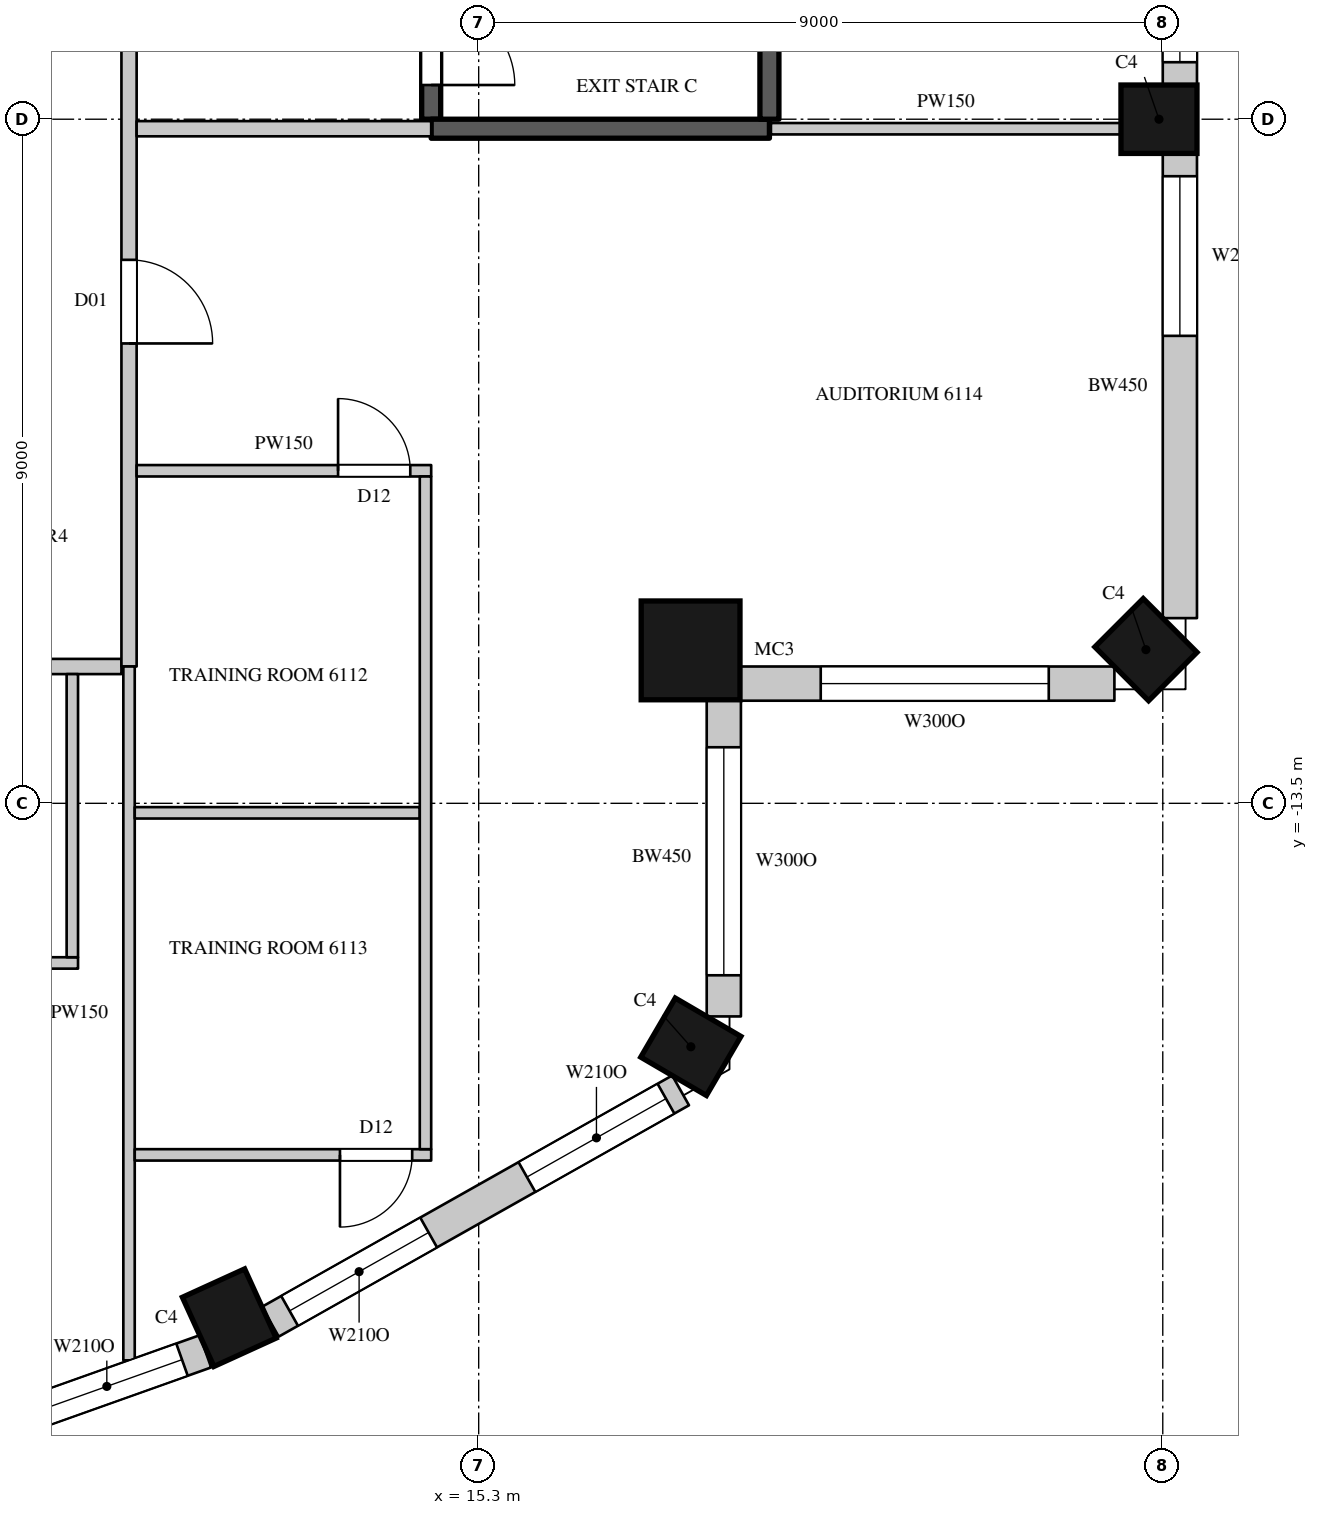
"""IFC4 building model, lengths in metres.
Left out: names, types, materials, properties, quantities, classifications, styles, units other than length and angle.
Written with IfcOpenShell. Run it as: python <this file> out.ifc"""

import sys

from ifc_helpers import new_model, si_unit, direction, frame, frame_2d, origin, origin_2d, place, context, subcontext, project, spatial, rectangle, circle, extrude, element, fill, save


model = new_model("IFC4")
c1 = context("Model", 3, precision=1e-05, world=origin(), true_north=direction((0.0, 1.0)))
c2 = subcontext(c1, "Body", "Model", "MODEL_VIEW")
j1 = project(units=[si_unit("LENGTHUNIT", "METRE"), si_unit("PLANEANGLEUNIT", "RADIAN")], contexts=[c1])
p1 = place(None, origin())
s1 = spatial("IfcSite", under=j1, at=p1, CompositionType="ELEMENT")
p2 = place(p1, origin())
s2 = spatial("IfcBuilding", under=s1, at=p2, CompositionType="ELEMENT")
p3 = place(p2, frame((0.0, 0.0, 272.1)))
s3 = spatial("IfcBuildingStorey", under=s2, at=p3, CompositionType="ELEMENT", Elevation=272.1)
for number, where, z_axis, x_axis in (
    (1, (12.019, -20.267, 0.0), (0.0, 0.0, 1.0), (0.91, 0.415, 0.0)),
    (2, (18.091, -16.703, 0.0), (0.0, 0.0, 1.0), (0.504, 0.863, 0.0)),
):
    element("IfcColumn", number, at=place(p3, frame(where, z_axis=z_axis, x_axis=x_axis)), inside=s3, PredefinedType="COLUMN", context=c2, shape_type="SweptSolid", body=[
        extrude(rectangle(XDim=0.9, YDim=1.0, at=origin_2d()), origin(), (0.0, 0.0, 1.0), 4.1),
    ])
p4 = place(p3, frame((18.088, -11.488, 0.0), z_axis=(0.0, 0.0, 1.0), x_axis=(1.0, 0.0, 0.0)))
e3 = element("IfcColumn", 3, at=p4, inside=s3, PredefinedType="COLUMN", context=c2, shape_type="SweptSolid", body=[
    extrude(circle(Radius=0.65, at=origin_2d()), origin(), (0.0, 0.0, 1.0), 4.1),
])
for number, where, z_axis, x_axis in (
    (4, (24.078, -11.478, 0.0), (0.0, 0.0, 1.0), (0.707, 0.707, 0.0)),
    (5, (24.25, -4.5, 0.0), (0.0, 0.0, 1.0), (0.0, 1.0, 0.0)),
):
    element("IfcColumn", number, at=place(p3, frame(where, z_axis=z_axis, x_axis=x_axis)), inside=s3, PredefinedType="COLUMN", context=c2, shape_type="SweptSolid", body=[
        extrude(rectangle(XDim=0.9, YDim=1.0, at=origin_2d()), origin(), (0.0, 0.0, 1.0), 4.1),
    ])
p5 = place(p3, frame((5.665, -22.859, 0.0), z_axis=(0.0, 0.0, 1.0), x_axis=(0.942108340262, 0.335308626803, 0.0)))
e6 = element("IfcWall", 6, at=p5, inside=s3, PredefinedType="SOLIDWALL", context=c2, shape_type="SweptSolid", body=[
    extrude(rectangle(XDim=6.412, YDim=0.45, at=frame_2d((3.206, 0.0))), origin(), (0.0, 0.0, 1.0), 3.8),
])
p6 = place(p5, frame((0.327, 0.0, 1.05)))
e7 = element("IfcOpeningElement", 7, at=p6, cuts=e6, PredefinedType="OPENING", context=c2, shape_type="SweptSolid", body=[
    extrude(rectangle(XDim=2.1, YDim=2.4, at=frame_2d((1.05, 1.2))), frame((0.0, 0.235, 0.0), z_axis=(0.0, -1.0, 0.0), x_axis=(1.0, 0.0, 0.0)), (0.0, 0.0, 1.0), 0.47),
])
p7 = place(p5, frame((3.985, 0.0, 1.05)))
e8 = element("IfcOpeningElement", 8, at=p7, cuts=e6, PredefinedType="OPENING", context=c2, shape_type="SweptSolid", body=[
    extrude(rectangle(XDim=2.1, YDim=2.4, at=frame_2d((1.05, 1.2))), frame((0.0, 0.235, 0.0), z_axis=(0.0, -1.0, 0.0), x_axis=(1.0, 0.0, 0.0)), (0.0, 0.0, 1.0), 0.47),
])
p8 = place(p3, frame((12.559, -20.32, 0.0), z_axis=(0.0, 0.0, 1.0), x_axis=(0.871065783524, 0.491166367714, 0.0)))
e9 = element("IfcWall", 9, at=p8, inside=s3, PredefinedType="SOLIDWALL", context=c2, shape_type="SweptSolid", body=[
    extrude(rectangle(XDim=6.196, YDim=0.45, at=frame_2d((3.098, 0.0))), origin(), (0.0, 0.0, 1.0), 3.8),
])
p9 = place(p8, frame((0.291, 0.0, 1.05)))
e10 = element("IfcOpeningElement", 10, at=p9, cuts=e9, PredefinedType="OPENING", context=c2, shape_type="SweptSolid", body=[
    extrude(rectangle(XDim=2.1, YDim=2.4, at=frame_2d((1.05, 1.2))), frame((0.0, 0.235, 0.0), z_axis=(0.0, -1.0, 0.0), x_axis=(1.0, 0.0, 0.0)), (0.0, 0.0, 1.0), 0.47),
])
p10 = place(p8, frame((3.875, 0.0, 1.05)))
e11 = element("IfcOpeningElement", 11, at=p10, cuts=e9, PredefinedType="OPENING", context=c2, shape_type="SweptSolid", body=[
    extrude(rectangle(XDim=2.1, YDim=2.4, at=frame_2d((1.05, 1.2))), frame((0.0, 0.235, 0.0), z_axis=(0.0, -1.0, 0.0), x_axis=(1.0, 0.0, 0.0)), (0.0, 0.0, 1.0), 0.47),
])
p11 = place(p3, frame((18.525, -16.304, 0.0), z_axis=(0.0, 0.0, 1.0), x_axis=(0.0, 1.0, 0.0)))
e12 = element("IfcWall", 12, at=p11, inside=s3, PredefinedType="SOLIDWALL", context=c2, shape_type="SweptSolid", body=[
    extrude(rectangle(XDim=4.202, YDim=0.45, at=frame_2d((2.101, 0.0))), origin(), (0.0, 0.0, 1.0), 3.8),
])
p12 = place(p11, frame((0.541, 0.0, 1.05)))
e13 = element("IfcOpeningElement", 13, at=p12, cuts=e12, PredefinedType="OPENING", context=c2, shape_type="SweptSolid", body=[
    extrude(rectangle(XDim=3.0, YDim=2.4, at=frame_2d((1.5, 1.2))), frame((0.0, 0.235, 0.0), z_axis=(0.0, -1.0, 0.0), x_axis=(1.0, 0.0, 0.0)), (0.0, 0.0, 1.0), 0.47),
])
p13 = place(p3, frame((18.701, -11.925, 0.0), z_axis=(0.0, 0.0, 1.0), x_axis=(1.0, 0.0, 0.0)))
e14 = element("IfcWall", 14, at=p13, inside=s3, PredefinedType="SOLIDWALL", context=c2, shape_type="SweptSolid", body=[
    extrude(rectangle(XDim=4.962, YDim=0.45, at=frame_2d((2.481, 0.0))), origin(), (0.0, 0.0, 1.0), 3.8),
])
p14 = place(p13, frame((1.098, 0.0, 1.05)))
e15 = element("IfcOpeningElement", 15, at=p14, cuts=e14, PredefinedType="OPENING", context=c2, shape_type="SweptSolid", body=[
    extrude(rectangle(XDim=3.0, YDim=2.4, at=frame_2d((1.5, 1.2))), frame((0.0, 0.235, 0.0), z_axis=(0.0, -1.0, 0.0), x_axis=(1.0, 0.0, 0.0)), (0.0, 0.0, 1.0), 0.47),
])
p15 = place(p3, frame((24.525, -11.064, 0.0), z_axis=(0.0, 0.0, 1.0), x_axis=(0.0, 1.0, 0.0)))
e16 = element("IfcWall", 16, at=p15, inside=s3, PredefinedType="SOLIDWALL", context=c2, shape_type="SweptSolid", body=[
    extrude(rectangle(XDim=6.114, YDim=0.45, at=frame_2d((3.057, 0.0))), origin(), (0.0, 0.0, 1.0), 3.8),
])
p16 = place(p15, frame((3.714, 0.0, 1.05)))
e17 = element("IfcOpeningElement", 17, at=p16, cuts=e16, PredefinedType="OPENING", context=c2, shape_type="SweptSolid", body=[
    extrude(rectangle(XDim=2.1, YDim=2.4, at=frame_2d((1.05, 1.2))), frame((0.0, 0.235, 0.0), z_axis=(0.0, -1.0, 0.0), x_axis=(1.0, 0.0, 0.0)), (0.0, 0.0, 1.0), 0.47),
])
p17 = place(p3, frame((24.525, -4.05, 0.0), z_axis=(0.0, 0.0, 1.0), x_axis=(0.0, 1.0, 0.0)))
e18 = element("IfcWall", 18, at=p17, inside=s3, PredefinedType="SOLIDWALL", context=c2, shape_type="SweptSolid", body=[
    extrude(rectangle(XDim=8.1, YDim=0.45, at=frame_2d((4.05, 0.0))), origin(), (0.0, 0.0, 1.0), 3.8),
])
p18 = place(p17, frame((0.3, 0.0, 1.05)))
e19 = element("IfcOpeningElement", 19, at=p18, cuts=e18, PredefinedType="OPENING", context=c2, shape_type="SweptSolid", body=[
    extrude(rectangle(XDim=3.0, YDim=2.4, at=frame_2d((1.5, 1.2))), frame((0.0, 0.235, 0.0), z_axis=(0.0, -1.0, 0.0), x_axis=(1.0, 0.0, 0.0)), (0.0, 0.0, 1.0), 0.47),
])
p19 = place(p17, frame((4.8, 0.0, 1.05)))
e20 = element("IfcOpeningElement", 20, at=p19, cuts=e18, PredefinedType="OPENING", context=c2, shape_type="SweptSolid", body=[
    extrude(rectangle(XDim=3.0, YDim=2.4, at=frame_2d((1.5, 1.2))), frame((0.0, 0.235, 0.0), z_axis=(0.0, -1.0, 0.0), x_axis=(1.0, 0.0, 0.0)), (0.0, 0.0, 1.0), 0.47),
])
p20 = place(p3, frame((-10.9, -11.7, 0.0), z_axis=(0.0, 0.0, 1.0), x_axis=(1.0, 0.0, 0.0)))
e21 = element("IfcWall", 21, at=p20, inside=s3, PredefinedType="PARTITIONING", context=c2, shape_type="SweptSolid", body=[
    extrude(rectangle(XDim=21.5, YDim=0.2, at=frame_2d((10.75, 0.0))), origin(), (0.0, 0.0, 1.0), 3.8),
])
p21 = place(p20, frame((0.95, 0.0, 0.0)))
e22 = element("IfcOpeningElement", 22, at=p21, cuts=e21, PredefinedType="OPENING", context=c2, shape_type="SweptSolid", body=[
    extrude(rectangle(XDim=0.95, YDim=2.2, at=frame_2d((0.475, 1.1))), frame((0.0, 0.11, 0.0), z_axis=(0.0, -1.0, 0.0), x_axis=(1.0, 0.0, 0.0)), (0.0, 0.0, 1.0), 0.22),
])
p22 = place(p20, frame((4.2, 0.0, 0.0)))
e23 = element("IfcOpeningElement", 23, at=p22, cuts=e21, PredefinedType="OPENING", context=c2, shape_type="SweptSolid", body=[
    extrude(rectangle(XDim=0.9, YDim=2.2, at=frame_2d((0.45, 1.1))), frame((0.0, 0.11, 0.0), z_axis=(0.0, -1.0, 0.0), x_axis=(1.0, 0.0, 0.0)), (0.0, 0.0, 1.0), 0.22),
])
p23 = place(p20, frame((6.85, 0.0, 0.0)))
e24 = element("IfcOpeningElement", 24, at=p23, cuts=e21, PredefinedType="OPENING", context=c2, shape_type="SweptSolid", body=[
    extrude(rectangle(XDim=1.1, YDim=2.4, at=frame_2d((0.55, 1.2))), frame((0.0, 0.11, 0.0), z_axis=(0.0, -1.0, 0.0), x_axis=(1.0, 0.0, 0.0)), (0.0, 0.0, 1.0), 0.22),
])
p24 = place(p20, frame((9.95, 0.0, 0.0)))
e25 = element("IfcOpeningElement", 25, at=p24, cuts=e21, PredefinedType="OPENING", context=c2, shape_type="SweptSolid", body=[
    extrude(rectangle(XDim=1.1, YDim=2.4, at=frame_2d((0.55, 1.2))), frame((0.0, 0.11, 0.0), z_axis=(0.0, -1.0, 0.0), x_axis=(1.0, 0.0, 0.0)), (0.0, 0.0, 1.0), 0.22),
])
p25 = place(p3, frame((10.7, -11.7, 0.0), z_axis=(0.0, 0.0, 1.0), x_axis=(0.0, 1.0, 0.0)))
e26 = element("IfcWall", 26, at=p25, inside=s3, PredefinedType="PARTITIONING", context=c2, shape_type="SweptSolid", body=[
    extrude(rectangle(XDim=23.8, YDim=0.2, at=frame_2d((11.9, 0.0))), origin(), (0.0, 0.0, 1.0), 3.8),
])
p26 = place(p25, frame((12.35, 0.0, 0.0)))
e27 = element("IfcOpeningElement", 27, at=p26, cuts=e26, PredefinedType="OPENING", context=c2, shape_type="SweptSolid", body=[
    extrude(rectangle(XDim=1.5, YDim=2.4, at=frame_2d((0.75, 1.2))), frame((0.0, 0.11, 0.0), z_axis=(0.0, -1.0, 0.0), x_axis=(1.0, 0.0, 0.0)), (0.0, 0.0, 1.0), 0.22),
])
p27 = place(p25, frame((19.55, 0.0, 0.0)))
e28 = element("IfcOpeningElement", 28, at=p27, cuts=e26, PredefinedType="OPENING", context=c2, shape_type="SweptSolid", body=[
    extrude(rectangle(XDim=1.1, YDim=2.4, at=frame_2d((0.55, 1.2))), frame((0.0, 0.11, 0.0), z_axis=(0.0, -1.0, 0.0), x_axis=(1.0, 0.0, 0.0)), (0.0, 0.0, 1.0), 0.22),
])
p28 = place(p25, frame((4.25, 0.0, 0.0)))
e29 = element("IfcOpeningElement", 29, at=p28, cuts=e26, PredefinedType="OPENING", context=c2, shape_type="SweptSolid", body=[
    extrude(rectangle(XDim=1.1, YDim=2.4, at=frame_2d((0.55, 1.2))), frame((0.0, 0.11, 0.0), z_axis=(0.0, -1.0, 0.0), x_axis=(1.0, 0.0, 0.0)), (0.0, 0.0, 1.0), 0.22),
])
p29 = place(p3, frame((10.8, -4.625, 0.0), z_axis=(0.0, 0.0, 1.0), x_axis=(1.0, 0.0, 0.0)))
e30 = element("IfcWall", 30, at=p29, inside=s3, PredefinedType="PARTITIONING", context=c2, shape_type="SweptSolid", body=[
    extrude(rectangle(XDim=3.875, YDim=0.2, at=frame_2d((1.938, 0.0))), origin(), (0.0, 0.0, 1.0), 3.8),
])
p30 = place(p3, frame((2.379, -15.6, 0.0), z_axis=(0.0, 0.0, 1.0), x_axis=(1.0, 0.0, 0.0)))
e31 = element("IfcWall", 31, at=p30, inside=s3, PredefinedType="PARTITIONING", context=c2, shape_type="SweptSolid", body=[
    extrude(rectangle(XDim=7.65, YDim=0.15, at=frame_2d((3.825, 0.0))), origin(), (0.0, 0.0, 1.0), 3.8),
])
p31 = place(p30, frame((4.85, 0.0, 0.0)))
e32 = element("IfcOpeningElement", 32, at=p31, cuts=e31, PredefinedType="OPENING", context=c2, shape_type="SweptSolid", body=[
    extrude(rectangle(XDim=0.95, YDim=2.2, at=frame_2d((0.475, 1.1))), frame((0.0, 0.085, 0.0), z_axis=(0.0, -1.0, 0.0), x_axis=(1.0, 0.0, 0.0)), (0.0, 0.0, 1.0), 0.17),
])
p32 = place(p3, frame((9.954, -15.525, 0.0), z_axis=(0.0, 0.0, 1.0), x_axis=(0.0, 1.0, 0.0)))
e33 = element("IfcWall", 33, at=p32, inside=s3, PredefinedType="PARTITIONING", context=c2, shape_type="SweptSolid", body=[
    extrude(rectangle(XDim=3.725, YDim=0.15, at=frame_2d((1.862, 0.0))), origin(), (0.0, 0.0, 1.0), 3.8),
])
p33 = place(p3, frame((10.7, -20.828, 0.0), z_axis=(0.0, 0.0, 1.0), x_axis=(0.0, 1.0, 0.0)))
e34 = element("IfcWall", 34, at=p33, inside=s3, PredefinedType="PARTITIONING", context=c2, shape_type="SweptSolid", body=[
    extrude(rectangle(XDim=9.128, YDim=0.15, at=frame_2d((4.564, 0.0))), origin(), (0.0, 0.0, 1.0), 3.8),
])
p34 = place(p3, frame((10.775, -18.125, 0.0), z_axis=(0.0, 0.0, 1.0), x_axis=(1.0, 0.0, 0.0)))
e35 = element("IfcWall", 35, at=p34, inside=s3, PredefinedType="PARTITIONING", context=c2, shape_type="SweptSolid", body=[
    extrude(rectangle(XDim=3.9, YDim=0.15, at=frame_2d((1.95, 0.0))), origin(), (0.0, 0.0, 1.0), 3.8),
])
p35 = place(p34, frame((2.7, 0.0, 0.0)))
e36 = element("IfcOpeningElement", 36, at=p35, cuts=e35, PredefinedType="OPENING", context=c2, shape_type="SweptSolid", body=[
    extrude(rectangle(XDim=0.95, YDim=2.2, at=frame_2d((0.475, 1.1))), frame((0.0, 0.085, 0.0), z_axis=(0.0, -1.0, 0.0), x_axis=(1.0, 0.0, 0.0)), (0.0, 0.0, 1.0), 0.17),
])
p36 = place(p3, frame((10.775, -13.625, 0.0), z_axis=(0.0, 0.0, 1.0), x_axis=(1.0, 0.0, 0.0)))
e37 = element("IfcWall", 37, at=p36, inside=s3, PredefinedType="PARTITIONING", context=c2, shape_type="SweptSolid", body=[
    extrude(rectangle(XDim=3.75, YDim=0.15, at=frame_2d((1.875, 0.0))), origin(), (0.0, 0.0, 1.0), 3.8),
])
p37 = place(p3, frame((10.8, -9.125, 0.0), z_axis=(0.0, 0.0, 1.0), x_axis=(1.0, 0.0, 0.0)))
e38 = element("IfcWall", 38, at=p37, inside=s3, PredefinedType="PARTITIONING", context=c2, shape_type="SweptSolid", body=[
    extrude(rectangle(XDim=3.875, YDim=0.15, at=frame_2d((1.938, 0.0))), origin(), (0.0, 0.0, 1.0), 3.8),
])
p38 = place(p37, frame((2.65, 0.0, 0.0)))
e39 = element("IfcOpeningElement", 39, at=p38, cuts=e38, PredefinedType="OPENING", context=c2, shape_type="SweptSolid", body=[
    extrude(rectangle(XDim=0.95, YDim=2.2, at=frame_2d((0.475, 1.1))), frame((0.0, 0.085, 0.0), z_axis=(0.0, -1.0, 0.0), x_axis=(1.0, 0.0, 0.0)), (0.0, 0.0, 1.0), 0.17),
])
p39 = place(p3, frame((14.6, -18.05, 0.0), z_axis=(0.0, 0.0, 1.0), x_axis=(0.0, 1.0, 0.0)))
e40 = element("IfcWall", 40, at=p39, inside=s3, PredefinedType="PARTITIONING", context=c2, shape_type="SweptSolid", body=[
    extrude(rectangle(XDim=8.85, YDim=0.15, at=frame_2d((4.425, 0.0))), origin(), (0.0, 0.0, 1.0), 3.8),
])
p40 = place(p3, frame((19.145, -4.625, 0.0), z_axis=(0.0, 0.0, 1.0), x_axis=(1.0, 0.0, 0.0)))
e41 = element("IfcWall", 41, at=p40, inside=s3, PredefinedType="PARTITIONING", context=c2, shape_type="SweptSolid", body=[
    extrude(rectangle(XDim=4.605, YDim=0.15, at=frame_2d((2.302, 0.0))), origin(), (0.0, 0.0, 1.0), 3.8),
])
p41 = place(p3, frame((14.675, -4.5, 0.0), z_axis=(0.0, 0.0, 1.0), x_axis=(0.0, 1.0, 0.0)))
e42 = element("IfcWall", 42, at=p41, inside=s3, PredefinedType="SHEAR", context=c2, shape_type="SweptSolid", body=[
    extrude(rectangle(XDim=9.0, YDim=0.25, at=frame_2d((4.5, 0.0))), origin(), (0.0, 0.0, 1.0), 3.8),
])
p42 = place(p41, frame((0.45, 0.0, 0.0)))
e43 = element("IfcOpeningElement", 43, at=p42, cuts=e42, PredefinedType="OPENING", context=c2, shape_type="SweptSolid", body=[
    extrude(rectangle(XDim=1.1, YDim=2.2, at=frame_2d((0.55, 1.1))), frame((0.0, 0.135, 0.0), z_axis=(0.0, -1.0, 0.0), x_axis=(1.0, 0.0, 0.0)), (0.0, 0.0, 1.0), 0.27),
])
p43 = place(p3, frame((14.675, -4.625, 0.0), z_axis=(0.0, 0.0, 1.0), x_axis=(1.0, 0.0, 0.0)))
e44 = element("IfcWall", 44, at=p43, inside=s3, PredefinedType="SHEAR", context=c2, shape_type="SweptSolid", body=[
    extrude(rectangle(XDim=4.45, YDim=0.25, at=frame_2d((2.225, 0.0))), origin(), (0.0, 0.0, 1.0), 3.8),
])
p44 = place(p3, frame((19.125, -4.5, 0.0), z_axis=(0.0, 0.0, 1.0), x_axis=(0.0, 1.0, 0.0)))
e45 = element("IfcWall", 45, at=p44, inside=s3, PredefinedType="SHEAR", context=c2, shape_type="SweptSolid", body=[
    extrude(rectangle(XDim=9.0, YDim=0.25, at=frame_2d((4.5, 0.0))), origin(), (0.0, 0.0, 1.0), 3.8),
])
p45 = place(p7, origin())
e46 = element("IfcWindow", 46, at=p45, inside=s3, PartitioningType="SINGLE_PANEL", PredefinedType="WINDOW", context=c2, shape_type="SweptSolid", body=[
    extrude(rectangle(XDim=2.1, YDim=2.4, at=frame_2d((1.05, 1.2))), frame((0.0, 0.135, 0.0), z_axis=(0.0, -1.0, 0.0), x_axis=(1.0, 0.0, 0.0)), (0.0, 0.0, 1.0), 0.06),
])
fill(e8, e46)
p46 = place(p9, origin())
e47 = element("IfcWindow", 47, at=p46, inside=s3, PartitioningType="SINGLE_PANEL", PredefinedType="WINDOW", context=c2, shape_type="SweptSolid", body=[
    extrude(rectangle(XDim=2.1, YDim=2.4, at=frame_2d((1.05, 1.2))), frame((0.0, 0.135, 0.0), z_axis=(0.0, -1.0, 0.0), x_axis=(1.0, 0.0, 0.0)), (0.0, 0.0, 1.0), 0.06),
])
fill(e10, e47)
p47 = place(p10, origin())
e48 = element("IfcWindow", 48, at=p47, inside=s3, PartitioningType="SINGLE_PANEL", PredefinedType="WINDOW", context=c2, shape_type="SweptSolid", body=[
    extrude(rectangle(XDim=2.1, YDim=2.4, at=frame_2d((1.05, 1.2))), frame((0.0, 0.135, 0.0), z_axis=(0.0, -1.0, 0.0), x_axis=(1.0, 0.0, 0.0)), (0.0, 0.0, 1.0), 0.06),
])
fill(e11, e48)
p48 = place(p12, origin())
e49 = element("IfcWindow", 49, at=p48, inside=s3, PartitioningType="SINGLE_PANEL", PredefinedType="WINDOW", context=c2, shape_type="SweptSolid", body=[
    extrude(rectangle(XDim=3.0, YDim=2.4, at=frame_2d((1.5, 1.2))), frame((0.0, 0.135, 0.0), z_axis=(0.0, -1.0, 0.0), x_axis=(1.0, 0.0, 0.0)), (0.0, 0.0, 1.0), 0.06),
])
fill(e13, e49)
p49 = place(p14, origin())
e50 = element("IfcWindow", 50, at=p49, inside=s3, PartitioningType="SINGLE_PANEL", PredefinedType="WINDOW", context=c2, shape_type="SweptSolid", body=[
    extrude(rectangle(XDim=3.0, YDim=2.4, at=frame_2d((1.5, 1.2))), frame((0.0, 0.135, 0.0), z_axis=(0.0, -1.0, 0.0), x_axis=(1.0, 0.0, 0.0)), (0.0, 0.0, 1.0), 0.06),
])
fill(e15, e50)
p50 = place(p16, origin())
e51 = element("IfcWindow", 51, at=p50, inside=s3, PartitioningType="SINGLE_PANEL", PredefinedType="WINDOW", context=c2, shape_type="SweptSolid", body=[
    extrude(rectangle(XDim=2.1, YDim=2.4, at=frame_2d((1.05, 1.2))), frame((0.0, 0.135, 0.0), z_axis=(0.0, -1.0, 0.0), x_axis=(1.0, 0.0, 0.0)), (0.0, 0.0, 1.0), 0.06),
])
fill(e17, e51)
p51 = place(p18, origin())
e52 = element("IfcWindow", 52, at=p51, inside=s3, PartitioningType="SINGLE_PANEL", PredefinedType="WINDOW", context=c2, shape_type="SweptSolid", body=[
    extrude(rectangle(XDim=3.0, YDim=2.4, at=frame_2d((1.5, 1.2))), frame((0.0, 0.135, 0.0), z_axis=(0.0, -1.0, 0.0), x_axis=(1.0, 0.0, 0.0)), (0.0, 0.0, 1.0), 0.06),
])
fill(e19, e52)
p52 = place(p28, origin())
e53 = element("IfcDoor", 53, at=p52, inside=s3, OperationType="SINGLE_SWING_RIGHT", PredefinedType="DOOR", context=c2, shape_type="SweptSolid", body=[
    extrude(rectangle(XDim=1.1, YDim=2.4, at=frame_2d((0.55, 1.2))), frame((0.0, 0.025, 0.0), z_axis=(0.0, -1.0, 0.0), x_axis=(1.0, 0.0, 0.0)), (0.0, 0.0, 1.0), 0.05),
])
fill(e29, e53)
p53 = place(p38, origin())
e54 = element("IfcDoor", 54, at=p53, inside=s3, OperationType="SINGLE_SWING_LEFT", PredefinedType="DOOR", context=c2, shape_type="SweptSolid", body=[
    extrude(rectangle(XDim=0.95, YDim=2.2, at=frame_2d((0.475, 1.1))), frame((0.0, 0.025, 0.0), z_axis=(0.0, -1.0, 0.0), x_axis=(1.0, 0.0, 0.0)), (0.0, 0.0, 1.0), 0.05),
])
fill(e39, e54)
p54 = place(p35, origin())
e55 = element("IfcDoor", 55, at=p54, inside=s3, OperationType="SINGLE_SWING_RIGHT", PredefinedType="DOOR", context=c2, shape_type="SweptSolid", body=[
    extrude(rectangle(XDim=0.95, YDim=2.2, at=frame_2d((0.475, 1.1))), frame((0.0, 0.025, 0.0), z_axis=(0.0, -1.0, 0.0), x_axis=(1.0, 0.0, 0.0)), (0.0, 0.0, 1.0), 0.05),
])
fill(e36, e55)
p55 = place(p42, origin())
e56 = element("IfcDoor", 56, at=p55, inside=s3, OperationType="SINGLE_SWING_RIGHT", PredefinedType="DOOR", context=c2, shape_type="SweptSolid", body=[
    extrude(rectangle(XDim=1.1, YDim=2.2, at=frame_2d((0.55, 1.1))), frame((0.0, 0.025, 0.0), z_axis=(0.0, -1.0, 0.0), x_axis=(1.0, 0.0, 0.0)), (0.0, 0.0, 1.0), 0.05),
])
fill(e43, e56)
save(model, sys.argv[1])
